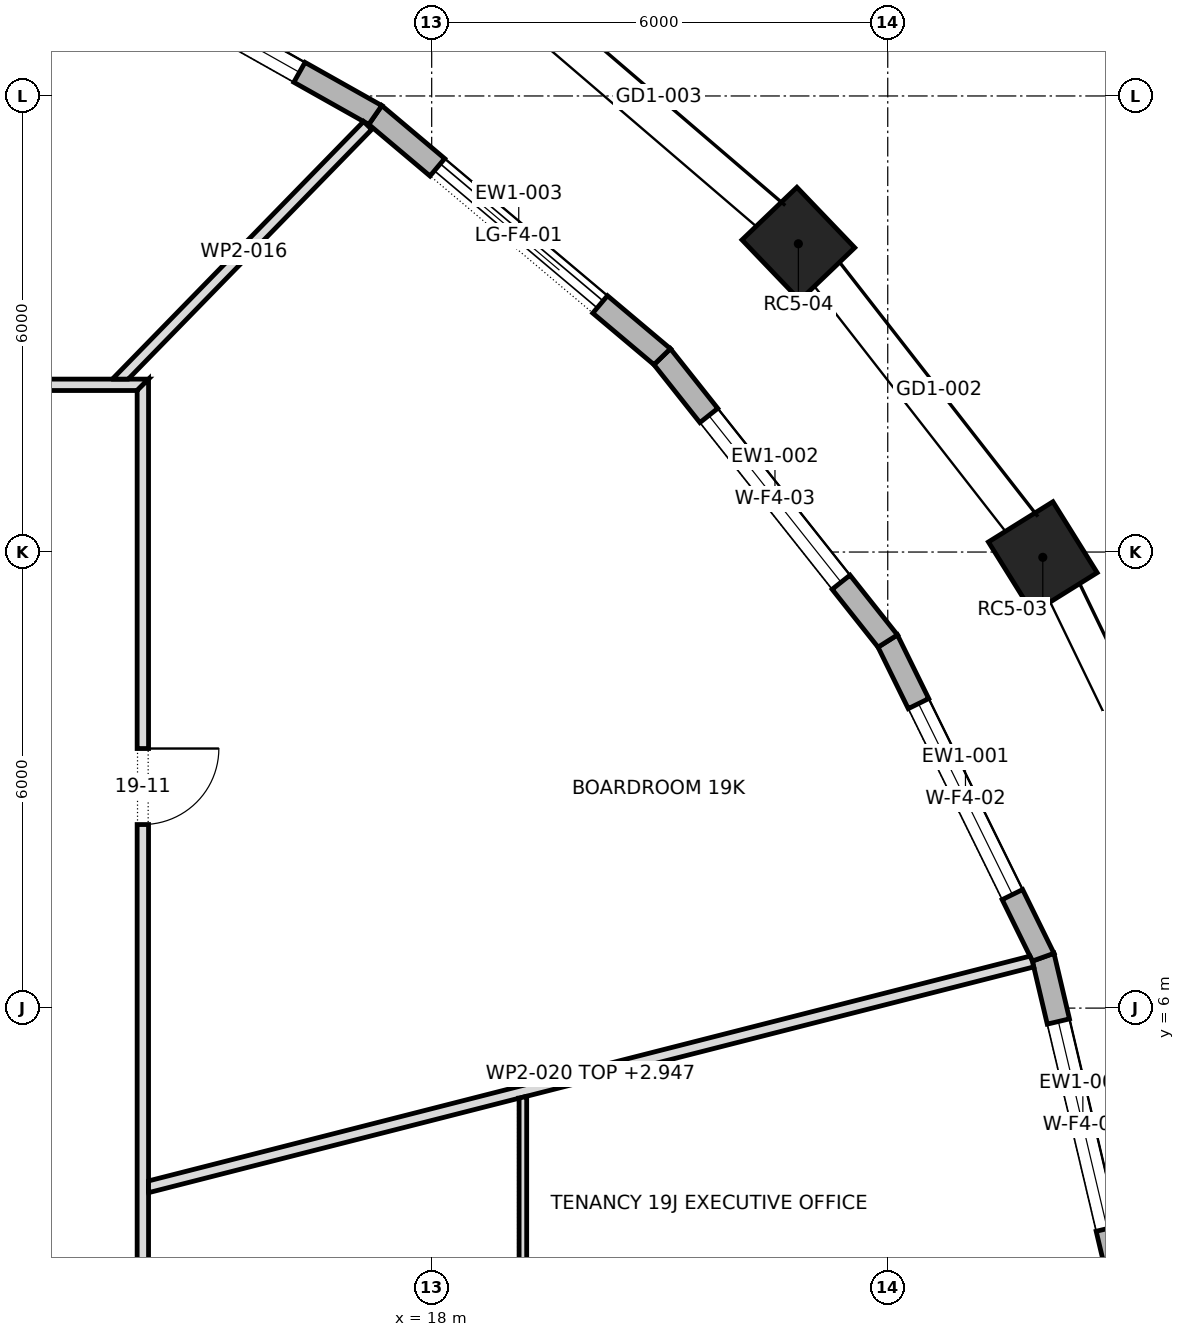
"""IFC4 building model, lengths in metres.
Left out: names, types, materials, properties, quantities, classifications, styles, units other than length and angle.
Written with IfcOpenShell. Run it as: python <this file> out.ifc"""

import sys

from ifc_helpers import new_model, si_unit, direction, frame, frame_2d, origin, origin_2d, place, context, subcontext, project, spatial, polyline, rectangle, outline, extrude, element, fill, save


model = new_model("IFC4")
c1 = context("Model", 3, precision=1e-05, world=origin(), true_north=direction((0.0, 1.0)))
c2 = subcontext(c1, "Body", "Model", "MODEL_VIEW")
j1 = project(units=[si_unit("LENGTHUNIT", "METRE"), si_unit("PLANEANGLEUNIT", "RADIAN")], contexts=[c1])
p1 = place(None, origin())
s1 = spatial("IfcSite", under=j1, at=p1, CompositionType="ELEMENT")
p2 = place(p1, origin())
s2 = spatial("IfcBuilding", under=s1, at=p2, CompositionType="ELEMENT")
p3 = place(p2, frame((0.0, 0.0, 276.3)))
s3 = spatial("IfcBuildingStorey", under=s2, at=p3, CompositionType="ELEMENT", Elevation=276.3)
for number, where, z_axis, x_axis in (
    (1, (26.04, 11.93, 0.0), (0.0, 0.0, 1.0), (-0.529, 0.849, 0.0)),
    (2, (22.824, 16.055, 0.0), (0.0, 0.0, 1.0), (-0.692, 0.722, 0.0)),
):
    element("IfcColumn", number, at=place(p3, frame(where, z_axis=z_axis, x_axis=x_axis)), inside=s3, PredefinedType="COLUMN", context=c2, shape_type="SweptSolid", body=[
        extrude(rectangle(XDim=1.1, YDim=1.0, at=origin_2d()), origin(), (0.0, 0.0, 1.0), 4.0),
    ])
p4 = place(p3, frame((27.088, 2.252, 0.0), z_axis=(0.0, 0.0, 1.0), x_axis=(-0.22983372436, 0.973229910734, 0.0)))
e3 = element("IfcWall", 3, at=p4, inside=s3, PredefinedType="STANDARD", context=c2, shape_type="SweptSolid", body=[
    extrude(outline(polyline([(-0.018, -0.15), (4.556, -0.15), (4.522, 0.15), (0.018, 0.15), (-0.018, -0.15)])), origin(), (0.0, 0.0, 1.0), 3.7),
])
p5 = place(p4, frame((0.869, 0.0, 0.6)))
e4 = element("IfcOpeningElement", 4, at=p5, cuts=e3, PredefinedType="OPENING", context=c2, shape_type="SweptSolid", body=[
    extrude(rectangle(XDim=2.8, YDim=2.65, at=frame_2d((1.4, 1.325))), frame((0.0, 0.162, 0.0), z_axis=(0.0, -1.0, 0.0), x_axis=(1.0, 0.0, 0.0)), (0.0, 0.0, 1.0), 0.324),
])
p6 = place(p3, frame((26.045, 6.67, 0.0), z_axis=(0.0, 0.0, 1.0), x_axis=(-0.441261940724, 0.897378348117, 0.0)))
e5 = element("IfcWall", 5, at=p6, inside=s3, PredefinedType="STANDARD", context=c2, shape_type="SweptSolid", body=[
    extrude(outline(polyline([(-0.017, -0.15), (4.651, -0.15), (4.619, 0.15), (0.017, 0.15), (-0.017, -0.15)])), origin(), (0.0, 0.0, 1.0), 3.7),
])
p7 = place(p6, frame((0.917, 0.0, 0.6)))
e6 = element("IfcOpeningElement", 6, at=p7, cuts=e5, PredefinedType="OPENING", context=c2, shape_type="SweptSolid", body=[
    extrude(rectangle(XDim=2.8, YDim=2.65, at=frame_2d((1.4, 1.325))), frame((0.0, 0.162, 0.0), z_axis=(0.0, -1.0, 0.0), x_axis=(1.0, 0.0, 0.0)), (0.0, 0.0, 1.0), 0.324),
])
p8 = place(p3, frame((24.0, 10.829, 0.0), z_axis=(0.0, 0.0, 1.0), x_axis=(-0.621434755851, 0.783465917715, 0.0)))
e7 = element("IfcWall", 7, at=p8, inside=s3, PredefinedType="STANDARD", context=c2, shape_type="SweptSolid", body=[
    extrude(outline(polyline([(-0.016, -0.15), (4.79, -0.15), (4.76, 0.15), (0.016, 0.15), (-0.016, -0.15)])), origin(), (0.0, 0.0, 1.0), 3.7),
])
p9 = place(p8, frame((0.987, 0.0, 0.6)))
e8 = element("IfcOpeningElement", 8, at=p9, cuts=e7, PredefinedType="OPENING", context=c2, shape_type="SweptSolid", body=[
    extrude(rectangle(XDim=2.8, YDim=2.65, at=frame_2d((1.4, 1.325))), frame((0.0, 0.162, 0.0), z_axis=(0.0, -1.0, 0.0), x_axis=(1.0, 0.0, 0.0)), (0.0, 0.0, 1.0), 0.324),
])
p10 = place(p3, frame((21.032, 14.57, 0.0), z_axis=(0.0, 0.0, 1.0), x_axis=(-0.764832940795, 0.644228664897, 0.0)))
e9 = element("IfcWall", 9, at=p10, inside=s3, PredefinedType="STANDARD", context=c2, shape_type="SweptSolid", body=[
    extrude(outline(polyline([(-0.015, -0.15), (4.949, -0.15), (4.921, 0.15), (0.015, 0.15), (-0.015, -0.15)])), origin(), (0.0, 0.0, 1.0), 3.7),
])
p11 = place(p10, frame((1.068, 0.0, 0.0)))
e10 = element("IfcOpeningElement", 10, at=p11, cuts=e9, PredefinedType="OPENING", context=c2, shape_type="SweptSolid", body=[
    extrude(rectangle(XDim=2.8, YDim=3.25, at=frame_2d((1.4, 1.625))), frame((0.0, 0.162, 0.0), z_axis=(0.0, -1.0, 0.0), x_axis=(1.0, 0.0, 0.0)), (0.0, 0.0, 1.0), 0.324),
])
p12 = place(p3, frame((17.258, 17.75, 0.0), z_axis=(0.0, 0.0, 1.0), x_axis=(-0.871433320402, 0.490513983585, 0.0)))
e11 = element("IfcWall", 11, at=p12, inside=s3, PredefinedType="STANDARD", context=c2, shape_type="SweptSolid", body=[
    extrude(outline(polyline([(-0.014, -0.15), (5.104, -0.15), (5.077, 0.15), (0.014, 0.15), (-0.014, -0.15)])), origin(), (0.0, 0.0, 1.0), 3.7),
])
p13 = place(p12, frame((1.145, 0.0, 0.6)))
e12 = element("IfcOpeningElement", 12, at=p13, cuts=e11, PredefinedType="OPENING", context=c2, shape_type="SweptSolid", body=[
    extrude(rectangle(XDim=2.8, YDim=2.65, at=frame_2d((1.4, 1.325))), frame((0.0, 0.162, 0.0), z_axis=(0.0, -1.0, 0.0), x_axis=(1.0, 0.0, 0.0)), (0.0, 0.0, 1.0), 0.324),
])
p14 = place(p3, frame((-14.275, 14.2, 0.0), z_axis=(0.0, 0.0, 1.0), x_axis=(1.0, 0.0, 0.0)))
e13 = element("IfcWall", 13, at=p14, inside=s3, PredefinedType="PARTITIONING", context=c2, shape_type="SweptSolid", body=[
    extrude(outline(polyline([(0.15, -0.075), (2.033, -0.075), (3.917, -0.075), (5.8, -0.075), (7.683, -0.075), (9.567, -0.075), (11.45, -0.075), (13.333, -0.075), (15.217, -0.075), (17.1, -0.075), (18.983, -0.075), (20.866, -0.075), (22.75, -0.075), (24.633, -0.075), (26.517, -0.075), (28.4, -0.075), (28.55, 0.075), (28.55, 0.075), (26.646, 0.075), (24.743, 0.075), (22.84, 0.075), (20.937, 0.075), (19.033, 0.075), (17.13, 0.075), (15.227, 0.075), (13.323, 0.075), (11.42, 0.075), (9.517, 0.075), (7.613, 0.075), (5.71, 0.075), (3.807, 0.075), (1.903, 0.075), (0.0, 0.075), (0.15, -0.075)])), origin(), (0.0, 0.0, 1.0), 3.7),
])
p15 = place(p14, frame((5.845, 0.0, 0.0)))
e14 = element("IfcOpeningElement", 14, at=p15, cuts=e13, PredefinedType="OPENING", context=c2, shape_type="SweptSolid", body=[
    extrude(rectangle(XDim=1.0, YDim=2.1, at=frame_2d((0.5, 1.05))), frame((0.0, 0.087, 0.0), z_axis=(0.0, -1.0, 0.0), x_axis=(1.0, 0.0, 0.0)), (0.0, 0.0, 1.0), 0.174),
])
p16 = place(p14, frame((19.86, 0.0, 0.0)))
e15 = element("IfcOpeningElement", 15, at=p16, cuts=e13, PredefinedType="OPENING", context=c2, shape_type="SweptSolid", body=[
    extrude(rectangle(XDim=1.0, YDim=2.1, at=frame_2d((0.5, 1.05))), frame((0.0, 0.087, 0.0), z_axis=(0.0, -1.0, 0.0), x_axis=(1.0, 0.0, 0.0)), (0.0, 0.0, 1.0), 0.174),
])
p17 = place(p3, frame((13.852, 14.223, 0.0), z_axis=(0.0, 0.0, 1.0), x_axis=(0.69820654799, 0.715896372629, 0.0)))
e16 = element("IfcWall", 16, at=p17, inside=s3, PredefinedType="PARTITIONING", context=c2, shape_type="SweptSolid", body=[
    extrude(outline(polyline([(4.734, -0.075), (4.734, 0.075), (4.734, 0.075), (3.156, 0.075), (1.578, 0.075), (0.0, 0.075), (0.0, 0.075), (0.146, -0.075), (1.675, -0.075), (3.205, -0.075), (4.734, -0.075)])), origin(), (0.0, 0.0, 1.0), 3.7),
])
p18 = place(p3, frame((14.2, -14.275, 0.0), z_axis=(0.0, 0.0, 1.0), x_axis=(0.0, 1.0, 0.0)))
e17 = element("IfcWall", 17, at=p18, inside=s3, PredefinedType="PARTITIONING", context=c2, shape_type="SweptSolid", body=[
    extrude(outline(polyline([(28.55, -0.075), (28.55, -0.075), (28.4, 0.075), (26.517, 0.075), (24.633, 0.075), (22.75, 0.075), (20.866, 0.075), (18.983, 0.075), (17.1, 0.075), (15.217, 0.075), (13.333, 0.075), (11.45, 0.075), (9.567, 0.075), (7.683, 0.075), (5.8, 0.075), (3.917, 0.075), (2.033, 0.075), (0.15, 0.075), (0.0, -0.075), (1.903, -0.075), (3.807, -0.075), (5.71, -0.075), (7.613, -0.075), (9.517, -0.075), (11.42, -0.075), (13.323, -0.075), (15.227, -0.075), (17.13, -0.075), (19.033, -0.075), (20.937, -0.075), (22.84, -0.075), (24.743, -0.075), (26.646, -0.075), (28.55, -0.075)])), origin(), (0.0, 0.0, 1.0), 3.7),
])
p19 = place(p18, frame((3.48, 0.0, 0.0)))
e18 = element("IfcOpeningElement", 18, at=p19, cuts=e17, PredefinedType="OPENING", context=c2, shape_type="SweptSolid", body=[
    extrude(rectangle(XDim=1.0, YDim=2.1, at=frame_2d((0.5, 1.05))), frame((0.0, 0.087, 0.0), z_axis=(0.0, -1.0, 0.0), x_axis=(1.0, 0.0, 0.0)), (0.0, 0.0, 1.0), 0.174),
])
p20 = place(p18, frame((9.99, 0.0, 0.0)))
e19 = element("IfcOpeningElement", 19, at=p20, cuts=e17, PredefinedType="OPENING", context=c2, shape_type="SweptSolid", body=[
    extrude(rectangle(XDim=1.0, YDim=2.1, at=frame_2d((0.5, 1.05))), frame((0.0, 0.087, 0.0), z_axis=(0.0, -1.0, 0.0), x_axis=(1.0, 0.0, 0.0)), (0.0, 0.0, 1.0), 0.174),
])
p21 = place(p18, frame((15.0, 0.0, 0.0)))
e20 = element("IfcOpeningElement", 20, at=p21, cuts=e17, PredefinedType="OPENING", context=c2, shape_type="SweptSolid", body=[
    extrude(rectangle(XDim=1.0, YDim=2.1, at=frame_2d((0.5, 1.05))), frame((0.0, 0.087, 0.0), z_axis=(0.0, -1.0, 0.0), x_axis=(1.0, 0.0, 0.0)), (0.0, 0.0, 1.0), 0.174),
])
p22 = place(p18, frame((22.69, 0.0, 0.0)))
e21 = element("IfcOpeningElement", 21, at=p22, cuts=e17, PredefinedType="OPENING", context=c2, shape_type="SweptSolid", body=[
    extrude(rectangle(XDim=1.0, YDim=2.1, at=frame_2d((0.5, 1.05))), frame((0.0, 0.087, 0.0), z_axis=(0.0, -1.0, 0.0), x_axis=(1.0, 0.0, 0.0)), (0.0, 0.0, 1.0), 0.174),
])
p23 = place(p3, frame((14.257, 3.645, 0.0), z_axis=(0.0, 0.0, 1.0), x_axis=(0.968990601513, 0.247097580277, 0.0)))
e22 = element("IfcWall", 22, at=p23, inside=s3, PredefinedType="PARTITIONING", context=c2, shape_type="SweptSolid", body=[
    extrude(outline(polyline([(12.019, -0.075), (12.019, 0.011), (12.005, 0.075), (10.011, 0.075), (8.016, 0.075), (6.022, 0.075), (4.027, 0.075), (2.033, 0.075), (0.038, 0.075), (0.0, -0.074), (0.0, -0.075), (1.717, -0.075), (3.434, -0.075), (5.151, -0.075), (6.868, -0.075), (8.585, -0.075), (10.302, -0.075), (12.019, -0.075)])), origin(), (0.0, 0.0, 1.0), 2.947),
])
p24 = place(p3, frame((19.2, 4.84, 0.0), z_axis=(0.0, 0.0, 1.0), x_axis=(0.0, -1.0, 0.0)))
e23 = element("IfcWall", 23, at=p24, inside=s3, PredefinedType="PARTITIONING", context=c2, shape_type="SweptSolid", body=[
    extrude(outline(polyline([(0.025, -0.05), (1.607, -0.05), (3.19, -0.05), (4.772, -0.05), (6.355, -0.05), (6.363, 0.045), (6.363, 0.05), (4.772, 0.05), (3.181, 0.05), (1.591, 0.05), (0.0, 0.05), (0.0, 0.049), (0.025, -0.05)])), origin(), (0.0, 0.0, 1.0), 3.7),
])
p25 = place(p24, frame((2.73, 0.0, 0.0)))
e24 = element("IfcOpeningElement", 24, at=p25, cuts=e23, PredefinedType="OPENING", context=c2, shape_type="SweptSolid", body=[
    extrude(rectangle(XDim=0.9, YDim=2.1, at=frame_2d((0.45, 1.05))), frame((0.0, 0.062, 0.0), z_axis=(0.0, -1.0, 0.0), x_axis=(1.0, 0.0, 0.0)), (0.0, 0.0, 1.0), 0.124),
])
p26 = place(p5, origin())
e25 = element("IfcWindow", 25, at=p26, inside=s3, PartitioningType="DOUBLE_PANEL_VERTICAL", PredefinedType="WINDOW", context=c2, shape_type="SweptSolid", body=[
    extrude(rectangle(XDim=2.8, YDim=2.65, at=frame_2d((1.4, 1.325))), frame((0.0, 0.03, 0.0), z_axis=(0.0, -1.0, 0.0), x_axis=(1.0, 0.0, 0.0)), (0.0, 0.0, 1.0), 0.06),
])
fill(e4, e25)
p27 = place(p7, origin())
e26 = element("IfcWindow", 26, at=p27, inside=s3, PartitioningType="DOUBLE_PANEL_VERTICAL", PredefinedType="WINDOW", context=c2, shape_type="SweptSolid", body=[
    extrude(rectangle(XDim=2.8, YDim=2.65, at=frame_2d((1.4, 1.325))), frame((0.0, 0.03, 0.0), z_axis=(0.0, -1.0, 0.0), x_axis=(1.0, 0.0, 0.0)), (0.0, 0.0, 1.0), 0.06),
])
fill(e6, e26)
p28 = place(p9, origin())
e27 = element("IfcWindow", 27, at=p28, inside=s3, PartitioningType="DOUBLE_PANEL_VERTICAL", PredefinedType="WINDOW", context=c2, shape_type="SweptSolid", body=[
    extrude(rectangle(XDim=2.8, YDim=2.65, at=frame_2d((1.4, 1.325))), frame((0.0, 0.03, 0.0), z_axis=(0.0, -1.0, 0.0), x_axis=(1.0, 0.0, 0.0)), (0.0, 0.0, 1.0), 0.06),
])
fill(e8, e27)
p29 = place(p11, origin())
e28 = element("IfcDoor", 28, at=p29, inside=s3, OperationType="DOUBLE_DOOR_SLIDING", PredefinedType="DOOR", context=c2, shape_type="SweptSolid", body=[
    extrude(rectangle(XDim=2.8, YDim=3.25, at=frame_2d((1.4, 1.625))), frame((0.0, 0.025, 0.0), z_axis=(0.0, -1.0, 0.0), x_axis=(1.0, 0.0, 0.0)), (0.0, 0.0, 1.0), 0.05),
])
fill(e10, e28)
p30 = place(p13, origin())
e29 = element("IfcWindow", 29, at=p30, inside=s3, PartitioningType="DOUBLE_PANEL_VERTICAL", PredefinedType="WINDOW", context=c2, shape_type="SweptSolid", body=[
    extrude(rectangle(XDim=2.8, YDim=2.65, at=frame_2d((1.4, 1.325))), frame((0.0, 0.03, 0.0), z_axis=(0.0, -1.0, 0.0), x_axis=(1.0, 0.0, 0.0)), (0.0, 0.0, 1.0), 0.06),
])
fill(e12, e29)
p31 = place(p22, frame((1.0, 0.0, 0.0), z_axis=(0.0, 0.0, 1.0), x_axis=(-1.0, 0.0, 0.0)))
e30 = element("IfcDoor", 30, at=p31, inside=s3, OperationType="SINGLE_SWING_RIGHT", PredefinedType="DOOR", context=c2, shape_type="SweptSolid", body=[
    extrude(rectangle(XDim=1.0, YDim=2.1, at=frame_2d((0.5, 1.05))), frame((0.0, 0.025, 0.0), z_axis=(0.0, -1.0, 0.0), x_axis=(1.0, 0.0, 0.0)), (0.0, 0.0, 1.0), 0.05),
])
fill(e21, e30)
save(model, sys.argv[1])
